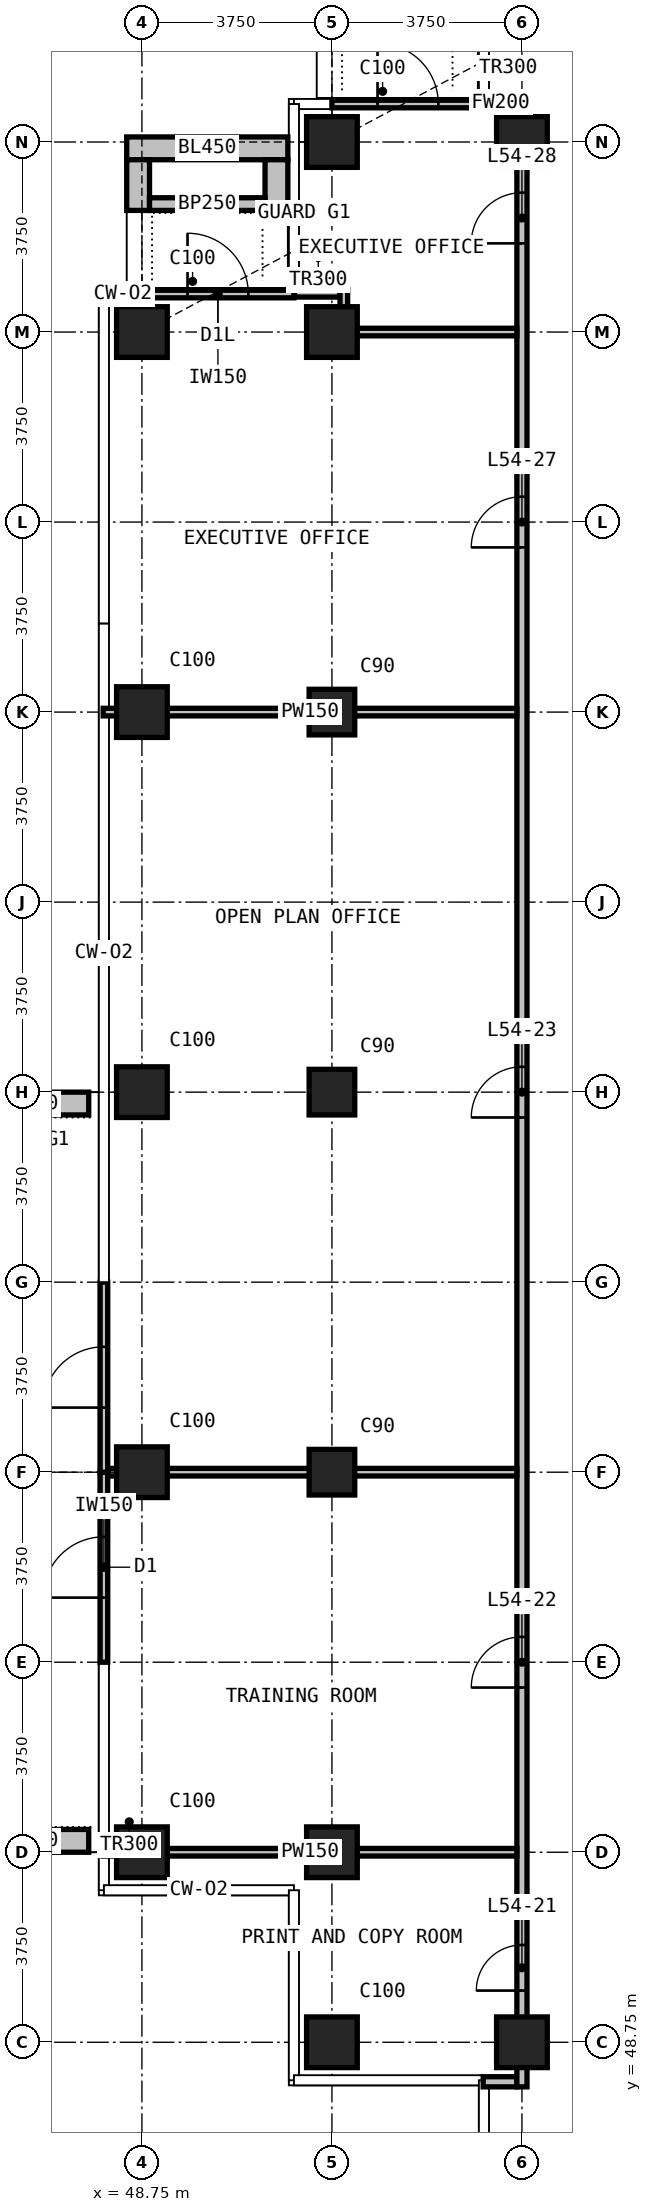
"""IFC4 building model, lengths in metres.
Left out: names, types, materials, properties, quantities, classifications, styles, units other than length and angle.
Written with IfcOpenShell. Run it as: python <this file> out.ifc"""

import sys

from ifc_helpers import new_model, si_unit, direction, frame, frame_2d, origin, origin_2d, place, context, subcontext, project, spatial, rectangle, extrude, element, fill, save


model = new_model("IFC4")
c1 = context("Model", 3, precision=1e-05, world=origin(), true_north=direction((0.0, 1.0)))
c2 = subcontext(c1, "Body", "Model", "MODEL_VIEW")
j1 = project(units=[si_unit("LENGTHUNIT", "METRE"), si_unit("PLANEANGLEUNIT", "RADIAN")], contexts=[c1])
p1 = place(None, origin())
s1 = spatial("IfcSite", under=j1, at=p1, CompositionType="ELEMENT")
p2 = place(p1, origin())
s2 = spatial("IfcBuilding", under=s1, at=p2, CompositionType="ELEMENT")
p3 = place(p2, frame((0.0, 0.0, 210.3)))
s3 = spatial("IfcBuildingStorey", under=s2, at=p3, CompositionType="ELEMENT", Elevation=210.3)
for number, where, z_axis, x_axis in (
    (1, (48.75, 52.5, 0.0), (0.0, 0.0, 1.0), (1.0, 0.0, 0.0)),
    (2, (48.75, 60.0, 0.0), (0.0, 0.0, 1.0), (1.0, 0.0, 0.0)),
    (3, (48.75, 67.5, 0.0), (0.0, 0.0, 1.0), (1.0, 0.0, 0.0)),
    (4, (48.75, 75.0, 0.0), (0.0, 0.0, 1.0), (1.0, 0.0, 0.0)),
    (5, (48.75, 82.5, 0.0), (0.0, 0.0, 1.0), (1.0, 0.0, 0.0)),
    (6, (52.5, 48.75, 0.0), (0.0, 0.0, 1.0), (1.0, 0.0, 0.0)),
    (7, (52.5, 52.5, 0.0), (0.0, 0.0, 1.0), (1.0, 0.0, 0.0)),
):
    element("IfcColumn", number, at=place(p3, frame(where, z_axis=z_axis, x_axis=x_axis)), inside=s3, PredefinedType="COLUMN", context=c2, shape_type="SweptSolid", body=[
        extrude(rectangle(XDim=1.0, YDim=1.0, at=origin_2d()), origin(), (0.0, 0.0, 1.0), 3.6),
    ])
for number, where, z_axis, x_axis in (
    (8, (52.5, 60.0, 0.0), (0.0, 0.0, 1.0), (1.0, 0.0, 0.0)),
    (9, (52.5, 67.5, 0.0), (0.0, 0.0, 1.0), (1.0, 0.0, 0.0)),
    (10, (52.5, 75.0, 0.0), (0.0, 0.0, 1.0), (1.0, 0.0, 0.0)),
):
    element("IfcColumn", number, at=place(p3, frame(where, z_axis=z_axis, x_axis=x_axis)), inside=s3, PredefinedType="COLUMN", context=c2, shape_type="SweptSolid", body=[
        extrude(rectangle(XDim=0.9, YDim=0.9, at=origin_2d()), origin(), (0.0, 0.0, 1.0), 3.6),
    ])
for number, where, z_axis, x_axis in (
    (11, (52.5, 82.5, 0.0), (0.0, 0.0, 1.0), (1.0, 0.0, 0.0)),
    (12, (52.5, 86.25, 0.0), (0.0, 0.0, 1.0), (1.0, 0.0, 0.0)),
    (13, (56.25, 48.75, 0.0), (0.0, 0.0, 1.0), (1.0, 0.0, 0.0)),
    (14, (56.25, 86.25, 0.0), (0.0, 0.0, 1.0), (1.0, 0.0, 0.0)),
):
    element("IfcColumn", number, at=place(p3, frame(where, z_axis=z_axis, x_axis=x_axis)), inside=s3, PredefinedType="COLUMN", context=c2, shape_type="SweptSolid", body=[
        extrude(rectangle(XDim=1.0, YDim=1.0, at=origin_2d()), origin(), (0.0, 0.0, 1.0), 3.6),
    ])
p4 = place(p3, frame((52.5, 87.0, 0.0), z_axis=(0.0, 0.0, 1.0), x_axis=(1.0, 0.0, 0.0)))
e15 = element("IfcWall", 15, at=p4, inside=s3, PredefinedType="SOLIDWALL", context=c2, shape_type="SweptSolid", body=[
    extrude(rectangle(XDim=3.0, YDim=0.15, at=frame_2d((1.5, 0.0))), origin(), (0.0, 0.0, 1.0), 3.3),
])
p5 = place(p4, frame((0.9, 0.0, 0.0)))
e16 = element("IfcOpeningElement", 16, at=p5, cuts=e15, PredefinedType="OPENING", context=c2, shape_type="SweptSolid", body=[
    extrude(rectangle(XDim=1.2, YDim=2.0, at=frame_2d((0.6, 1.0))), frame((0.0, 0.085, 0.0), z_axis=(0.0, -1.0, 0.0), x_axis=(1.0, 0.0, 0.0)), (0.0, 0.0, 1.0), 0.17),
])
p6 = place(p3, frame((48.75, 83.25, 0.0), z_axis=(0.0, 0.0, 1.0), x_axis=(1.0, 0.0, 0.0)))
e17 = element("IfcWall", 17, at=p6, inside=s3, PredefinedType="SOLIDWALL", context=c2, shape_type="SweptSolid", body=[
    extrude(rectangle(XDim=3.0, YDim=0.15, at=frame_2d((1.5, 0.0))), origin(), (0.0, 0.0, 1.0), 3.3),
])
p7 = place(p6, frame((0.9, 0.0, 0.0)))
e18 = element("IfcOpeningElement", 18, at=p7, cuts=e17, PredefinedType="OPENING", context=c2, shape_type="SweptSolid", body=[
    extrude(rectangle(XDim=1.2, YDim=2.0, at=frame_2d((0.6, 1.0))), frame((0.0, 0.085, 0.0), z_axis=(0.0, -1.0, 0.0), x_axis=(1.0, 0.0, 0.0)), (0.0, 0.0, 1.0), 0.17),
])
p8 = place(p3, frame((48.0, 56.25, 0.0), z_axis=(0.0, 0.0, 1.0), x_axis=(0.0, 1.0, 0.0)))
e19 = element("IfcWall", 19, at=p8, inside=s3, PredefinedType="SOLIDWALL", context=c2, shape_type="SweptSolid", body=[
    extrude(rectangle(XDim=3.75, YDim=0.15, at=frame_2d((1.875, 0.0))), origin(), (0.0, 0.0, 1.0), 3.3),
])
p9 = place(p8, frame((1.275, 0.0, 0.0)))
e20 = element("IfcOpeningElement", 20, at=p9, cuts=e19, PredefinedType="OPENING", context=c2, shape_type="SweptSolid", body=[
    extrude(rectangle(XDim=1.2, YDim=2.4, at=frame_2d((0.6, 1.2))), frame((0.0, 0.085, 0.0), z_axis=(0.0, -1.0, 0.0), x_axis=(1.0, 0.0, 0.0)), (0.0, 0.0, 1.0), 0.17),
])
p10 = place(p3, frame((48.0, 60.0, 0.0), z_axis=(0.0, 0.0, 1.0), x_axis=(0.0, 1.0, 0.0)))
e21 = element("IfcWall", 21, at=p10, inside=s3, PredefinedType="SOLIDWALL", context=c2, shape_type="SweptSolid", body=[
    extrude(rectangle(XDim=3.75, YDim=0.15, at=frame_2d((1.875, 0.0))), origin(), (0.0, 0.0, 1.0), 3.3),
])
p11 = place(p10, frame((1.275, 0.0, 0.0)))
e22 = element("IfcOpeningElement", 22, at=p11, cuts=e21, PredefinedType="OPENING", context=c2, shape_type="SweptSolid", body=[
    extrude(rectangle(XDim=1.2, YDim=2.4, at=frame_2d((0.6, 1.2))), frame((0.0, 0.085, 0.0), z_axis=(0.0, -1.0, 0.0), x_axis=(1.0, 0.0, 0.0)), (0.0, 0.0, 1.0), 0.17),
])
p12 = place(p3, frame((48.45, 86.125, 0.0), z_axis=(0.0, 0.0, 1.0), x_axis=(1.0, 0.0, 0.0)))
e23 = element("IfcWall", 23, at=p12, inside=s3, PredefinedType="USERDEFINED", context=c2, shape_type="SweptSolid", body=[
    extrude(rectangle(XDim=3.18, YDim=0.45, at=frame_2d((1.59, 0.0))), origin(), (0.0, 0.0, 1.0), 1.1),
])
for number, where, z_axis, x_axis in (
    (24, (48.675, 84.9, 0.0), (0.0, 0.0, 1.0), (0.0, 1.0, 0.0)),
    (25, (51.405, 84.9, 0.0), (0.0, 0.0, 1.0), (0.0, 1.0, 0.0)),
):
    element("IfcWall", number, at=place(p3, frame(where, z_axis=z_axis, x_axis=x_axis)), inside=s3, PredefinedType="USERDEFINED", context=c2, shape_type="SweptSolid", body=[
        extrude(rectangle(XDim=1.0, YDim=0.45, at=frame_2d((0.5, 0.0))), origin(), (0.0, 0.0, 1.0), 1.1),
    ])
p13 = place(p3, frame((48.9, 85.025, 0.0), z_axis=(0.0, 0.0, 1.0), x_axis=(1.0, 0.0, 0.0)))
e26 = element("IfcWall", 26, at=p13, inside=s3, PredefinedType="USERDEFINED", context=c2, shape_type="SweptSolid", body=[
    extrude(rectangle(XDim=2.28, YDim=0.25, at=frame_2d((1.14, 0.0))), origin(), (0.0, 0.0, 1.0), 1.0),
])
for number, where, z_axis, x_axis in (
    (27, (47.7, 52.725, 0.0), (0.0, 0.0, 1.0), (-1.0, 0.0, 0.0)),
    (28, (47.7, 67.275, 0.0), (0.0, 0.0, 1.0), (-1.0, 0.0, 0.0)),
):
    element("IfcWall", number, at=place(p3, frame(where, z_axis=z_axis, x_axis=x_axis)), inside=s3, PredefinedType="USERDEFINED", context=c2, shape_type="SweptSolid", body=[
        extrude(rectangle(XDim=2.35, YDim=0.45, at=frame_2d((1.175, 0.0))), origin(), (0.0, 0.0, 1.0), 1.1),
    ])
p14 = place(p3, frame((55.485, 47.97, 0.0), z_axis=(0.0, 0.0, 1.0), x_axis=(1.0, 0.0, 0.0)))
e29 = element("IfcWall", 29, at=p14, inside=s3, PredefinedType="PARTITIONING", context=c2, shape_type="SweptSolid", body=[
    extrude(rectangle(XDim=0.665, YDim=0.2, at=frame_2d((0.333, 0.0))), origin(), (0.0, 0.0, 1.0), 3.3),
])
p15 = place(p3, frame((55.51, 87.03, 0.0), z_axis=(0.0, 0.0, 1.0), x_axis=(1.0, 0.0, 0.0)))
e30 = element("IfcWall", 30, at=p15, inside=s3, PredefinedType="PARTITIONING", context=c2, shape_type="SweptSolid", body=[
    extrude(rectangle(XDim=0.64, YDim=0.2, at=frame_2d((0.32, 0.0))), origin(), (0.0, 0.0, 1.0), 3.3),
])
p16 = place(p3, frame((56.25, 47.87, 0.0), z_axis=(0.0, 0.0, 1.0), x_axis=(0.0, 1.0, 0.0)))
e31 = element("IfcWall", 31, at=p16, inside=s3, PredefinedType="PARTITIONING", context=c2, shape_type="SweptSolid", body=[
    extrude(rectangle(XDim=39.26, YDim=0.2, at=frame_2d((19.63, 0.0))), origin(), (0.0, 0.0, 1.0), 3.3),
])
p17 = place(p16, frame((1.9, 0.0, 0.0)))
e32 = element("IfcOpeningElement", 32, at=p17, cuts=e31, PredefinedType="OPENING", context=c2, shape_type="SweptSolid", body=[
    extrude(rectangle(XDim=0.9, YDim=2.2, at=frame_2d((0.45, 1.1))), frame((0.0, 0.11, 0.0), z_axis=(0.0, -1.0, 0.0), x_axis=(1.0, 0.0, 0.0)), (0.0, 0.0, 1.0), 0.22),
])
p18 = place(p16, frame((7.88, 0.0, 0.0)))
e33 = element("IfcOpeningElement", 33, at=p18, cuts=e31, PredefinedType="OPENING", context=c2, shape_type="SweptSolid", body=[
    extrude(rectangle(XDim=1.0, YDim=2.2, at=frame_2d((0.5, 1.1))), frame((0.0, 0.11, 0.0), z_axis=(0.0, -1.0, 0.0), x_axis=(1.0, 0.0, 0.0)), (0.0, 0.0, 1.0), 0.22),
])
p19 = place(p16, frame((19.13, 0.0, 0.0)))
e34 = element("IfcOpeningElement", 34, at=p19, cuts=e31, PredefinedType="OPENING", context=c2, shape_type="SweptSolid", body=[
    extrude(rectangle(XDim=1.0, YDim=2.2, at=frame_2d((0.5, 1.1))), frame((0.0, 0.11, 0.0), z_axis=(0.0, -1.0, 0.0), x_axis=(1.0, 0.0, 0.0)), (0.0, 0.0, 1.0), 0.22),
])
p20 = place(p16, frame((30.38, 0.0, 0.0)))
e35 = element("IfcOpeningElement", 35, at=p20, cuts=e31, PredefinedType="OPENING", context=c2, shape_type="SweptSolid", body=[
    extrude(rectangle(XDim=1.0, YDim=2.2, at=frame_2d((0.5, 1.1))), frame((0.0, 0.11, 0.0), z_axis=(0.0, -1.0, 0.0), x_axis=(1.0, 0.0, 0.0)), (0.0, 0.0, 1.0), 0.22),
])
p21 = place(p16, frame((36.38, 0.0, 0.0)))
e36 = element("IfcOpeningElement", 36, at=p21, cuts=e31, PredefinedType="OPENING", context=c2, shape_type="SweptSolid", body=[
    extrude(rectangle(XDim=1.0, YDim=2.2, at=frame_2d((0.5, 1.1))), frame((0.0, 0.11, 0.0), z_axis=(0.0, -1.0, 0.0), x_axis=(1.0, 0.0, 0.0)), (0.0, 0.0, 1.0), 0.22),
])
p22 = place(p3, frame((47.985, 52.5, 0.0), z_axis=(0.0, 0.0, 1.0), x_axis=(1.0, 0.0, 0.0)))
e37 = element("IfcWall", 37, at=p22, inside=s3, PredefinedType="PARTITIONING", context=c2, shape_type="SweptSolid", body=[
    extrude(rectangle(XDim=8.165, YDim=0.15, at=frame_2d((4.083, 0.0))), origin(), (0.0, 0.0, 1.0), 3.3),
])
p23 = place(p3, frame((48.085, 60.0, 0.0), z_axis=(0.0, 0.0, 1.0), x_axis=(1.0, 0.0, 0.0)))
e38 = element("IfcWall", 38, at=p23, inside=s3, PredefinedType="PARTITIONING", context=c2, shape_type="SweptSolid", body=[
    extrude(rectangle(XDim=8.065, YDim=0.15, at=frame_2d((4.032, 0.0))), origin(), (0.0, 0.0, 1.0), 3.3),
])
p24 = place(p3, frame((47.985, 75.0, 0.0), z_axis=(0.0, 0.0, 1.0), x_axis=(1.0, 0.0, 0.0)))
e39 = element("IfcWall", 39, at=p24, inside=s3, PredefinedType="PARTITIONING", context=c2, shape_type="SweptSolid", body=[
    extrude(rectangle(XDim=8.165, YDim=0.15, at=frame_2d((4.083, 0.0))), origin(), (0.0, 0.0, 1.0), 3.3),
])
p25 = place(p3, frame((52.81, 82.5, 0.0), z_axis=(0.0, 0.0, 1.0), x_axis=(1.0, 0.0, 0.0)))
e40 = element("IfcWall", 40, at=p25, inside=s3, PredefinedType="PARTITIONING", context=c2, shape_type="SweptSolid", body=[
    extrude(rectangle(XDim=3.34, YDim=0.15, at=frame_2d((1.67, 0.0))), origin(), (0.0, 0.0, 1.0), 3.3),
])
p26 = place(p3, frame((51.76, 83.265, 0.0), z_axis=(0.0, 0.0, 1.0), x_axis=(1.0, 0.0, 0.0)))
e41 = element("IfcWall", 41, at=p26, inside=s3, PredefinedType="PARTITIONING", context=c2, shape_type="SweptSolid", body=[
    extrude(rectangle(XDim=0.9, YDim=0.15, at=frame_2d((0.45, 0.0))), origin(), (0.0, 0.0, 1.0), 3.3),
])
p27 = place(p3, frame((52.735, 82.425, 0.0), z_axis=(0.0, 0.0, 1.0), x_axis=(0.0, 1.0, 0.0)))
e42 = element("IfcWall", 42, at=p27, inside=s3, PredefinedType="PARTITIONING", context=c2, shape_type="SweptSolid", body=[
    extrude(rectangle(XDim=0.915, YDim=0.15, at=frame_2d((0.458, 0.0))), origin(), (0.0, 0.0, 1.0), 3.3),
])
p28 = place(p5, origin())
e43 = element("IfcDoor", 43, at=p28, inside=s3, OperationType="SINGLE_SWING_LEFT", PredefinedType="DOOR", context=c2, shape_type="SweptSolid", body=[
    extrude(rectangle(XDim=1.2, YDim=2.0, at=frame_2d((0.6, 1.0))), frame((0.0, 0.025, 0.0), z_axis=(0.0, -1.0, 0.0), x_axis=(1.0, 0.0, 0.0)), (0.0, 0.0, 1.0), 0.05),
])
fill(e16, e43)
p29 = place(p7, origin())
e44 = element("IfcDoor", 44, at=p29, inside=s3, OperationType="SINGLE_SWING_LEFT", PredefinedType="DOOR", context=c2, shape_type="SweptSolid", body=[
    extrude(rectangle(XDim=1.2, YDim=2.0, at=frame_2d((0.6, 1.0))), frame((0.0, 0.025, 0.0), z_axis=(0.0, -1.0, 0.0), x_axis=(1.0, 0.0, 0.0)), (0.0, 0.0, 1.0), 0.05),
])
fill(e18, e44)
p30 = place(p9, origin())
e45 = element("IfcDoor", 45, at=p30, inside=s3, OperationType="SINGLE_SWING_LEFT", PredefinedType="DOOR", context=c2, shape_type="SweptSolid", body=[
    extrude(rectangle(XDim=1.2, YDim=2.4, at=frame_2d((0.6, 1.2))), frame((0.0, 0.025, 0.0), z_axis=(0.0, -1.0, 0.0), x_axis=(1.0, 0.0, 0.0)), (0.0, 0.0, 1.0), 0.05),
])
fill(e20, e45)
p31 = place(p11, origin())
e46 = element("IfcDoor", 46, at=p31, inside=s3, OperationType="SINGLE_SWING_LEFT", PredefinedType="DOOR", context=c2, shape_type="SweptSolid", body=[
    extrude(rectangle(XDim=1.2, YDim=2.4, at=frame_2d((0.6, 1.2))), frame((0.0, 0.025, 0.0), z_axis=(0.0, -1.0, 0.0), x_axis=(1.0, 0.0, 0.0)), (0.0, 0.0, 1.0), 0.05),
])
fill(e22, e46)
p32 = place(p17, origin())
e47 = element("IfcDoor", 47, at=p32, inside=s3, OperationType="SINGLE_SWING_LEFT", PredefinedType="DOOR", context=c2, shape_type="SweptSolid", body=[
    extrude(rectangle(XDim=0.9, YDim=2.2, at=frame_2d((0.45, 1.1))), frame((0.0, 0.025, 0.0), z_axis=(0.0, -1.0, 0.0), x_axis=(1.0, 0.0, 0.0)), (0.0, 0.0, 1.0), 0.05),
])
fill(e32, e47)
p33 = place(p18, origin())
e48 = element("IfcDoor", 48, at=p33, inside=s3, OperationType="SINGLE_SWING_RIGHT", PredefinedType="DOOR", context=c2, shape_type="SweptSolid", body=[
    extrude(rectangle(XDim=1.0, YDim=2.2, at=frame_2d((0.5, 1.1))), frame((0.0, 0.025, 0.0), z_axis=(0.0, -1.0, 0.0), x_axis=(1.0, 0.0, 0.0)), (0.0, 0.0, 1.0), 0.05),
])
fill(e33, e48)
p34 = place(p19, origin())
e49 = element("IfcDoor", 49, at=p34, inside=s3, OperationType="SINGLE_SWING_LEFT", PredefinedType="DOOR", context=c2, shape_type="SweptSolid", body=[
    extrude(rectangle(XDim=1.0, YDim=2.2, at=frame_2d((0.5, 1.1))), frame((0.0, 0.025, 0.0), z_axis=(0.0, -1.0, 0.0), x_axis=(1.0, 0.0, 0.0)), (0.0, 0.0, 1.0), 0.05),
])
fill(e34, e49)
p35 = place(p20, origin())
e50 = element("IfcDoor", 50, at=p35, inside=s3, OperationType="SINGLE_SWING_LEFT", PredefinedType="DOOR", context=c2, shape_type="SweptSolid", body=[
    extrude(rectangle(XDim=1.0, YDim=2.2, at=frame_2d((0.5, 1.1))), frame((0.0, 0.025, 0.0), z_axis=(0.0, -1.0, 0.0), x_axis=(1.0, 0.0, 0.0)), (0.0, 0.0, 1.0), 0.05),
])
fill(e35, e50)
p36 = place(p21, origin())
e51 = element("IfcDoor", 51, at=p36, inside=s3, OperationType="SINGLE_SWING_LEFT", PredefinedType="DOOR", context=c2, shape_type="SweptSolid", body=[
    extrude(rectangle(XDim=1.0, YDim=2.2, at=frame_2d((0.5, 1.1))), frame((0.0, 0.025, 0.0), z_axis=(0.0, -1.0, 0.0), x_axis=(1.0, 0.0, 0.0)), (0.0, 0.0, 1.0), 0.05),
])
fill(e36, e51)
save(model, sys.argv[1])
